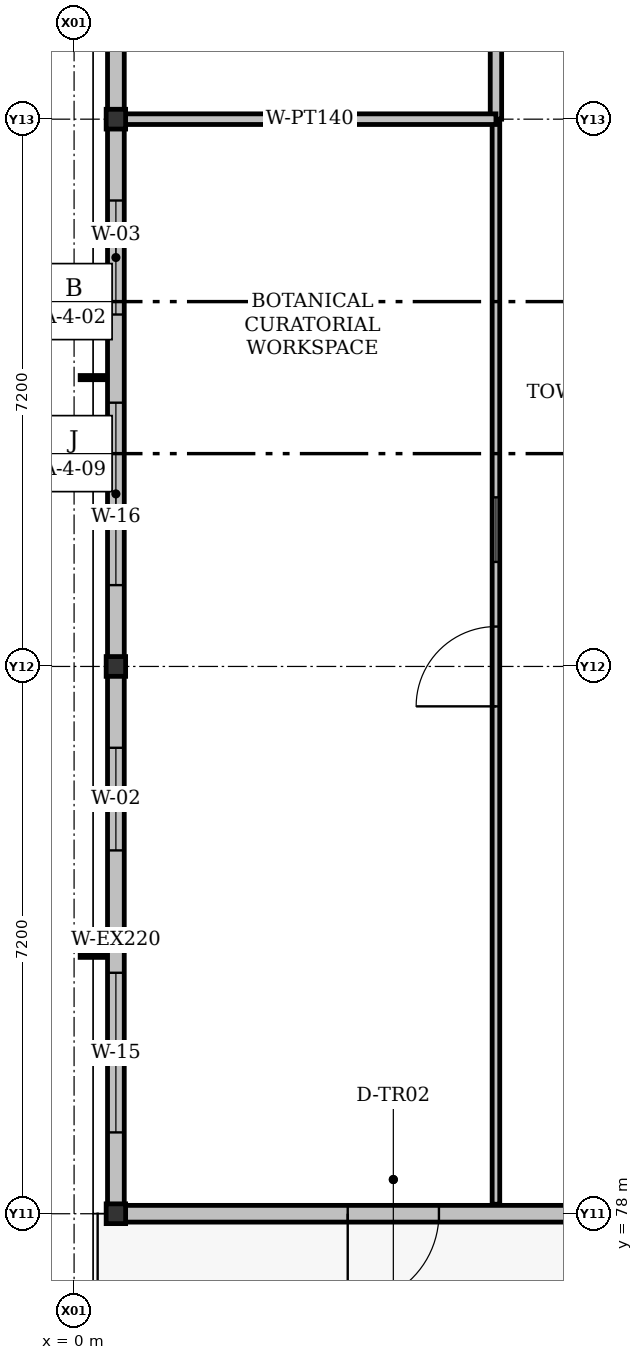
"""IFC4 building model, lengths in metres.
Left out: names, types, materials, properties, quantities, classifications, styles, units other than length and angle.
Written with IfcOpenShell. Run it as: python <this file> out.ifc"""

import sys

from ifc_helpers import new_model, si_unit, direction, frame, frame_2d, origin, origin_2d, place, context, subcontext, project, spatial, rectangle, i_section, extrude, element, fill, save


model = new_model("IFC4")
c1 = context("Model", 3, precision=1e-05, world=origin(), true_north=direction((0.0, 1.0)))
c2 = subcontext(c1, "Body", "Model", "MODEL_VIEW")
j1 = project(units=[si_unit("LENGTHUNIT", "METRE"), si_unit("PLANEANGLEUNIT", "RADIAN")], contexts=[c1])
p1 = place(None, origin())
s1 = spatial("IfcSite", under=j1, at=p1, CompositionType="ELEMENT")
p2 = place(p1, origin())
s2 = spatial("IfcBuilding", under=s1, at=p2, CompositionType="ELEMENT")
p3 = place(p2, frame((0.0, 0.0, 60.3)))
s3 = spatial("IfcBuildingStorey", under=s2, at=p3, CompositionType="ELEMENT", Elevation=60.3)
for number, where, z_axis, x_axis in (
    (1, (0.55, 78.0, 0.0), (0.0, 0.0, 1.0), (1.0, 0.0, 0.0)),
    (2, (0.55, 85.2, 0.0), (0.0, 0.0, 1.0), (1.0, 0.0, 0.0)),
    (3, (0.55, 92.4, 0.0), (0.0, 0.0, 1.0), (1.0, 0.0, 0.0)),
):
    element("IfcColumn", number, at=place(p3, frame(where, z_axis=z_axis, x_axis=x_axis)), inside=s3, PredefinedType="COLUMN", context=c2, shape_type="SweptSolid", body=[
        extrude(i_section(OverallWidth=0.256, OverallDepth=0.26, WebThickness=0.011, FlangeThickness=0.017, FilletRadius=0.013, at=origin_2d()), origin(), (0.0, 0.0, 1.0), 4.2),
    ])
p4 = place(p3, frame((0.55, 78.0, 0.0), z_axis=(0.0, 0.0, 1.0), x_axis=(0.0, 1.0, 0.0)))
e4 = element("IfcWall", 4, at=p4, inside=s3, PredefinedType="SOLIDWALL", context=c2, shape_type="SweptSolid", body=[
    extrude(rectangle(XDim=7.2, YDim=0.22, at=frame_2d((3.6, 0.0))), origin(), (0.0, 0.0, 1.0), 3.577),
])
p5 = place(p4, frame((1.07, 0.0, 0.92)))
e5 = element("IfcOpeningElement", 5, at=p5, cuts=e4, PredefinedType="OPENING", context=c2, shape_type="SweptSolid", body=[
    extrude(rectangle(XDim=2.1, YDim=1.7, at=frame_2d((1.05, 0.85))), frame((0.0, 0.11, 0.0), z_axis=(0.0, -1.0, 0.0), x_axis=(1.0, 0.0, 0.0)), (0.0, 0.0, 1.0), 0.22),
])
p6 = place(p4, frame((4.78, 0.0, 0.92)))
e6 = element("IfcOpeningElement", 6, at=p6, cuts=e4, PredefinedType="OPENING", context=c2, shape_type="SweptSolid", body=[
    extrude(rectangle(XDim=1.35, YDim=1.4, at=frame_2d((0.675, 0.7))), frame((0.0, 0.11, 0.0), z_axis=(0.0, -1.0, 0.0), x_axis=(1.0, 0.0, 0.0)), (0.0, 0.0, 1.0), 0.22),
])
p7 = place(p3, frame((0.55, 85.2, 0.0), z_axis=(0.0, 0.0, 1.0), x_axis=(0.0, 1.0, 0.0)))
e7 = element("IfcWall", 7, at=p7, inside=s3, PredefinedType="SOLIDWALL", context=c2, shape_type="SweptSolid", body=[
    extrude(rectangle(XDim=7.2, YDim=0.22, at=frame_2d((3.6, 0.0))), origin(), (0.0, 0.0, 1.0), 3.577),
])
p8 = place(p7, frame((1.07, 0.0, 0.92)))
e8 = element("IfcOpeningElement", 8, at=p8, cuts=e7, PredefinedType="OPENING", context=c2, shape_type="SweptSolid", body=[
    extrude(rectangle(XDim=2.4, YDim=1.7, at=frame_2d((1.2, 0.85))), frame((0.0, 0.11, 0.0), z_axis=(0.0, -1.0, 0.0), x_axis=(1.0, 0.0, 0.0)), (0.0, 0.0, 1.0), 0.22),
])
p9 = place(p7, frame((4.63, 0.0, 0.92)))
e9 = element("IfcOpeningElement", 9, at=p9, cuts=e7, PredefinedType="OPENING", context=c2, shape_type="SweptSolid", body=[
    extrude(rectangle(XDim=1.5, YDim=1.4, at=frame_2d((0.75, 0.7))), frame((0.0, 0.11, 0.0), z_axis=(0.0, -1.0, 0.0), x_axis=(1.0, 0.0, 0.0)), (0.0, 0.0, 1.0), 0.22),
])
p10 = place(p3, frame((0.55, 92.4, 0.0), z_axis=(0.0, 0.0, 1.0), x_axis=(0.0, 1.0, 0.0)))
e10 = element("IfcWall", 10, at=p10, inside=s3, PredefinedType="SOLIDWALL", context=c2, shape_type="SweptSolid", body=[
    extrude(rectangle(XDim=7.2, YDim=0.22, at=frame_2d((3.6, 0.0))), origin(), (0.0, 0.0, 1.0), 3.577),
])
p11 = place(p10, frame((1.07, 0.0, 0.92)))
e11 = element("IfcOpeningElement", 11, at=p11, cuts=e10, PredefinedType="OPENING", context=c2, shape_type="SweptSolid", body=[
    extrude(rectangle(XDim=0.9, YDim=1.3, at=frame_2d((0.45, 0.65))), frame((0.0, 0.11, 0.0), z_axis=(0.0, -1.0, 0.0), x_axis=(1.0, 0.0, 0.0)), (0.0, 0.0, 1.0), 0.22),
])
p12 = place(p10, frame((4.48, 0.0, 0.92)))
e12 = element("IfcOpeningElement", 12, at=p12, cuts=e10, PredefinedType="OPENING", context=c2, shape_type="SweptSolid", body=[
    extrude(rectangle(XDim=1.65, YDim=1.4, at=frame_2d((0.825, 0.7))), frame((0.0, 0.11, 0.0), z_axis=(0.0, -1.0, 0.0), x_axis=(1.0, 0.0, 0.0)), (0.0, 0.0, 1.0), 0.22),
])
p13 = place(p3, frame((7.85, 78.0, 0.0), z_axis=(0.0, 0.0, 1.0), x_axis=(-1.0, 0.0, 0.0)))
e13 = element("IfcWall", 13, at=p13, inside=s3, PredefinedType="SOLIDWALL", context=c2, shape_type="SweptSolid", body=[
    extrude(rectangle(XDim=7.3, YDim=0.22, at=frame_2d((3.65, 0.0))), origin(), (0.0, 0.0, 1.0), 3.577),
])
p14 = place(p13, frame((3.05, 0.0, 0.0)))
e14 = element("IfcOpeningElement", 14, at=p14, cuts=e13, PredefinedType="OPENING", context=c2, shape_type="SweptSolid", body=[
    extrude(rectangle(XDim=1.2, YDim=2.2, at=frame_2d((0.6, 1.1))), frame((0.0, 0.11, 0.0), z_axis=(0.0, -1.0, 0.0), x_axis=(1.0, 0.0, 0.0)), (0.0, 0.0, 1.0), 0.22),
])
p15 = place(p3, frame((5.55, 78.125, 0.0), z_axis=(0.0, 0.0, 1.0), x_axis=(0.0, 1.0, 0.0)))
e15 = element("IfcWall", 15, at=p15, inside=s3, PredefinedType="PARTITIONING", context=c2, shape_type="SweptSolid", body=[
    extrude(rectangle(XDim=14.275, YDim=0.1, at=frame_2d((7.137, 0.0))), origin(), (0.0, 0.0, 1.0), 3.451),
])
p16 = place(p15, frame((6.55, 0.0, 0.0)))
e16 = element("IfcOpeningElement", 16, at=p16, cuts=e15, PredefinedType="OPENING", context=c2, shape_type="SweptSolid", body=[
    extrude(rectangle(XDim=1.05, YDim=2.1, at=frame_2d((0.525, 1.05))), frame((0.0, 0.05, 0.0), z_axis=(0.0, -1.0, 0.0), x_axis=(1.0, 0.0, 0.0)), (0.0, 0.0, 1.0), 0.1),
])
p17 = place(p15, frame((8.45, 0.0, 0.92)))
e17 = element("IfcOpeningElement", 17, at=p17, cuts=e15, PredefinedType="OPENING", context=c2, shape_type="SweptSolid", body=[
    extrude(rectangle(XDim=0.85, YDim=1.1, at=frame_2d((0.425, 0.55))), frame((0.0, 0.05, 0.0), z_axis=(0.0, -1.0, 0.0), x_axis=(1.0, 0.0, 0.0)), (0.0, 0.0, 1.0), 0.1),
])
p18 = place(p3, frame((5.55, 92.4, 0.0), z_axis=(0.0, 0.0, 1.0), x_axis=(0.0, 1.0, 0.0)))
e18 = element("IfcWall", 18, at=p18, inside=s3, PredefinedType="PARTITIONING", context=c2, shape_type="SweptSolid", body=[
    extrude(rectangle(XDim=11.2, YDim=0.15, at=frame_2d((5.6, 0.0))), origin(), (0.0, 0.0, 1.0), 3.451),
])
p19 = place(p18, frame((5.06, 0.0, 0.0)))
e19 = element("IfcOpeningElement", 19, at=p19, cuts=e18, PredefinedType="OPENING", context=c2, shape_type="SweptSolid", body=[
    extrude(rectangle(XDim=1.08, YDim=2.1, at=frame_2d((0.54, 1.05))), frame((0.0, 0.075, 0.0), z_axis=(0.0, -1.0, 0.0), x_axis=(1.0, 0.0, 0.0)), (0.0, 0.0, 1.0), 0.15),
])
p20 = place(p18, frame((6.99, 0.0, 0.92)))
e20 = element("IfcOpeningElement", 20, at=p20, cuts=e18, PredefinedType="OPENING", context=c2, shape_type="SweptSolid", body=[
    extrude(rectangle(XDim=0.95, YDim=1.1, at=frame_2d((0.475, 0.55))), frame((0.0, 0.075, 0.0), z_axis=(0.0, -1.0, 0.0), x_axis=(1.0, 0.0, 0.0)), (0.0, 0.0, 1.0), 0.15),
])
p21 = place(p3, frame((0.65, 92.4, 0.0), z_axis=(0.0, 0.0, 1.0), x_axis=(1.0, 0.0, 0.0)))
e21 = element("IfcWall", 21, at=p21, inside=s3, PredefinedType="PARTITIONING", context=c2, shape_type="SweptSolid", body=[
    extrude(rectangle(XDim=4.9, YDim=0.14, at=frame_2d((2.45, 0.0))), origin(), (0.0, 0.0, 1.0), 3.451),
])
p22 = place(p5, origin())
e22 = element("IfcWindow", 22, at=p22, inside=s3, PartitioningType="DOUBLE_PANEL_VERTICAL", PredefinedType="WINDOW", context=c2, shape_type="SweptSolid", body=[
    extrude(rectangle(XDim=2.1, YDim=1.7, at=frame_2d((1.05, 0.85))), frame((0.0, 0.03, 0.0), z_axis=(0.0, -1.0, 0.0), x_axis=(1.0, 0.0, 0.0)), (0.0, 0.0, 1.0), 0.06),
])
fill(e5, e22)
p23 = place(p6, origin())
e23 = element("IfcWindow", 23, at=p23, inside=s3, PartitioningType="SINGLE_PANEL", PredefinedType="WINDOW", context=c2, shape_type="SweptSolid", body=[
    extrude(rectangle(XDim=1.35, YDim=1.4, at=frame_2d((0.675, 0.7))), frame((0.0, 0.03, 0.0), z_axis=(0.0, -1.0, 0.0), x_axis=(1.0, 0.0, 0.0)), (0.0, 0.0, 1.0), 0.06),
])
fill(e6, e23)
p24 = place(p8, origin())
e24 = element("IfcWindow", 24, at=p24, inside=s3, PartitioningType="DOUBLE_PANEL_VERTICAL", PredefinedType="WINDOW", context=c2, shape_type="SweptSolid", body=[
    extrude(rectangle(XDim=2.4, YDim=1.7, at=frame_2d((1.2, 0.85))), frame((0.0, 0.03, 0.0), z_axis=(0.0, -1.0, 0.0), x_axis=(1.0, 0.0, 0.0)), (0.0, 0.0, 1.0), 0.06),
])
fill(e8, e24)
p25 = place(p9, origin())
e25 = element("IfcWindow", 25, at=p25, inside=s3, PartitioningType="SINGLE_PANEL", PredefinedType="WINDOW", context=c2, shape_type="SweptSolid", body=[
    extrude(rectangle(XDim=1.5, YDim=1.4, at=frame_2d((0.75, 0.7))), frame((0.0, 0.03, 0.0), z_axis=(0.0, -1.0, 0.0), x_axis=(1.0, 0.0, 0.0)), (0.0, 0.0, 1.0), 0.06),
])
fill(e9, e25)
p26 = place(p14, origin())
e26 = element("IfcDoor", 26, at=p26, inside=s3, OperationType="SINGLE_SWING_RIGHT", PredefinedType="DOOR", context=c2, shape_type="SweptSolid", body=[
    extrude(rectangle(XDim=1.2, YDim=2.2, at=frame_2d((0.6, 1.1))), frame((0.0, 0.025, 0.0), z_axis=(0.0, -1.0, 0.0), x_axis=(1.0, 0.0, 0.0)), (0.0, 0.0, 1.0), 0.05),
])
fill(e14, e26)
p27 = place(p16, origin())
e27 = element("IfcDoor", 27, at=p27, inside=s3, OperationType="SINGLE_SWING_LEFT", PredefinedType="DOOR", context=c2, shape_type="SweptSolid", body=[
    extrude(rectangle(XDim=1.05, YDim=2.1, at=frame_2d((0.525, 1.05))), frame((0.0, 0.025, 0.0), z_axis=(0.0, -1.0, 0.0), x_axis=(1.0, 0.0, 0.0)), (0.0, 0.0, 1.0), 0.05),
])
fill(e16, e27)
p28 = place(p17, origin())
e28 = element("IfcWindow", 28, at=p28, inside=s3, PartitioningType="SINGLE_PANEL", PredefinedType="WINDOW", context=c2, shape_type="SweptSolid", body=[
    extrude(rectangle(XDim=0.85, YDim=1.1, at=frame_2d((0.425, 0.55))), frame((0.0, 0.03, 0.0), z_axis=(0.0, -1.0, 0.0), x_axis=(1.0, 0.0, 0.0)), (0.0, 0.0, 1.0), 0.06),
])
fill(e17, e28)
save(model, sys.argv[1])
